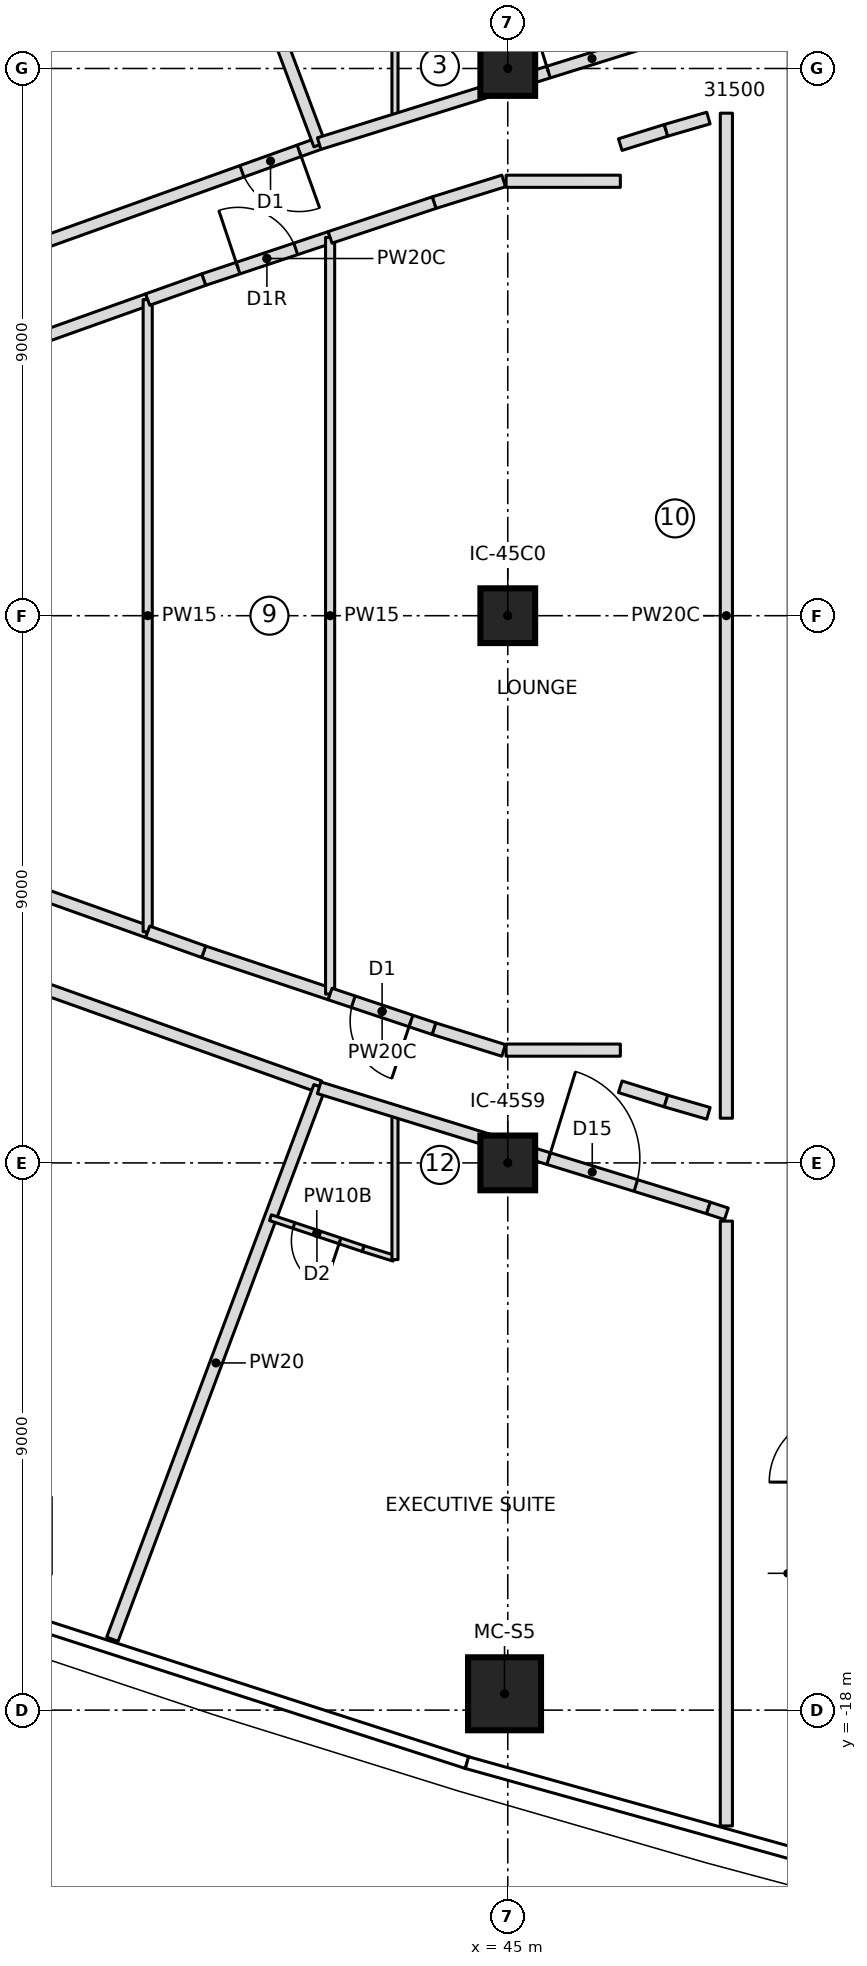
"""IFC4 building model, lengths in metres.
Left out: names, types, materials, properties, quantities, classifications, styles, units other than length and angle.
Written with IfcOpenShell. Run it as: python <this file> out.ifc"""

import sys

from ifc_helpers import new_model, si_unit, direction, frame, frame_2d, origin, origin_2d, place, context, subcontext, project, spatial, rectangle, extrude, element, fill, save


model = new_model("IFC4")
c1 = context("Model", 3, precision=1e-05, world=origin(), true_north=direction((0.0, 1.0)))
c2 = subcontext(c1, "Body", "Model", "MODEL_VIEW")
j1 = project(units=[si_unit("LENGTHUNIT", "METRE"), si_unit("PLANEANGLEUNIT", "RADIAN")], contexts=[c1])
p1 = place(None, origin())
s1 = spatial("IfcSite", under=j1, at=p1, CompositionType="ELEMENT")
p2 = place(p1, origin())
s2 = spatial("IfcBuilding", under=s1, at=p2, CompositionType="ELEMENT")
p3 = place(p2, frame((0.0, 0.0, 227.9)))
s3 = spatial("IfcBuildingStorey", under=s2, at=p3, CompositionType="ELEMENT", Elevation=227.9)
p4 = place(p3, frame((44.947, -17.731, 0.0), z_axis=(0.0, 0.0, 1.0), x_axis=(1.0, 0.0, 0.0)))
e1 = element("IfcColumn", 1, at=p4, inside=s3, PredefinedType="COLUMN", context=c2, shape_type="SweptSolid", body=[
    extrude(rectangle(XDim=1.2, YDim=1.2, at=origin_2d()), origin(), (0.0, 0.0, 1.0), 3.55),
])
for number, where, z_axis, x_axis in (
    (2, (45.0, -9.0, 0.0), (0.0, 0.0, 1.0), (1.0, 0.0, 0.0)),
    (3, (45.0, 0.0, 0.0), (0.0, 0.0, 1.0), (1.0, 0.0, 0.0)),
    (4, (45.0, 9.0, 0.0), (0.0, 0.0, 1.0), (1.0, 0.0, 0.0)),
):
    element("IfcColumn", number, at=place(p3, frame(where, z_axis=z_axis, x_axis=x_axis)), inside=s3, PredefinedType="COLUMN", context=c2, shape_type="SweptSolid", body=[
        extrude(rectangle(XDim=0.9, YDim=0.9, at=origin_2d()), origin(), (0.0, 0.0, 1.0), 3.55),
    ])
p5 = place(p3, frame((41.898, 7.764, 0.0), z_axis=(0.0, 0.0, 1.0), x_axis=(-0.941277643829, -0.337633525034, 0.0)))
e5 = element("IfcWall", 5, at=p5, inside=s3, PredefinedType="PARTITIONING", context=c2, shape_type="SweptSolid", body=[
    extrude(rectangle(XDim=10.001, YDim=0.2, at=frame_2d((5.0, 0.0))), origin(), (0.0, 0.0, 1.0), 3.25),
])
p6 = place(p5, frame((0.35, 0.0, 0.0)))
e6 = element("IfcOpeningElement", 6, at=p6, cuts=e5, PredefinedType="OPENING", context=c2, shape_type="SweptSolid", body=[
    extrude(rectangle(XDim=1.0, YDim=2.1, at=frame_2d((0.5, 1.05))), frame((0.0, 0.11, 0.0), z_axis=(0.0, -1.0, 0.0), x_axis=(1.0, 0.0, 0.0)), (0.0, 0.0, 1.0), 0.22),
])
p7 = place(p3, frame((41.906, 7.746, 0.0), z_axis=(0.0, 0.0, 1.0), x_axis=(-0.35112895446, 0.936327110224, 0.0)))
e7 = element("IfcWall", 7, at=p7, inside=s3, PredefinedType="PARTITIONING", context=c2, shape_type="SweptSolid", body=[
    extrude(rectangle(XDim=9.706, YDim=0.2, at=frame_2d((4.853, 0.0))), origin(), (0.0, 0.0, 1.0), 3.25),
])
p8 = place(p3, frame((32.485, -4.388, 0.0), z_axis=(0.0, 0.0, 1.0), x_axis=(0.941953797829, -0.335742524498, 0.0)))
e8 = element("IfcWall", 8, at=p8, inside=s3, PredefinedType="PARTITIONING", context=c2, shape_type="SweptSolid", body=[
    extrude(rectangle(XDim=10.001, YDim=0.2, at=frame_2d((5.001, 0.0))), origin(), (0.0, 0.0, 1.0), 3.25),
])
p9 = place(p8, frame((3.7, 0.0, 0.0)))
e9 = element("IfcOpeningElement", 9, at=p9, cuts=e8, PredefinedType="OPENING", context=c2, shape_type="SweptSolid", body=[
    extrude(rectangle(XDim=1.0, YDim=2.1, at=frame_2d((0.5, 1.05))), frame((0.0, 0.11, 0.0), z_axis=(0.0, -1.0, 0.0), x_axis=(1.0, 0.0, 0.0)), (0.0, 0.0, 1.0), 0.22),
])
p10 = place(p3, frame((38.497, -16.834, 0.0), z_axis=(0.0, 0.0, 1.0), x_axis=(0.35112895446, 0.936327110224, 0.0)))
e10 = element("IfcWall", 10, at=p10, inside=s3, PredefinedType="PARTITIONING", context=c2, shape_type="SweptSolid", body=[
    extrude(rectangle(XDim=9.706, YDim=0.2, at=frame_2d((4.853, 0.0))), origin(), (0.0, 0.0, 1.0), 3.25),
])
p11 = place(p3, frame((43.128, -10.568, 0.0), z_axis=(0.0, 0.0, 1.0), x_axis=(-0.954618903587, 0.297830067176, 0.0)))
e11 = element("IfcWall", 11, at=p11, inside=s3, PredefinedType="PARTITIONING", context=c2, shape_type="SweptSolid", body=[
    extrude(rectangle(XDim=0.531, YDim=0.1, at=frame_2d((0.266, 0.0))), origin(), (0.0, 0.0, 1.0), 3.25),
])
p12 = place(p3, frame((42.621, -10.409, 0.0), z_axis=(0.0, 0.0, 1.0), x_axis=(-0.948485479965, 0.3168206027, 0.0)))
e12 = element("IfcWall", 12, at=p12, inside=s3, PredefinedType="PARTITIONING", context=c2, shape_type="SweptSolid", body=[
    extrude(rectangle(XDim=1.606, YDim=0.1, at=frame_2d((0.803, 0.0))), origin(), (0.0, 0.0, 1.0), 3.25),
])
p13 = place(p12, frame((0.4, 0.0, 0.0)))
e13 = element("IfcOpeningElement", 13, at=p13, cuts=e12, PredefinedType="OPENING", context=c2, shape_type="SweptSolid", body=[
    extrude(rectangle(XDim=0.8, YDim=2.1, at=frame_2d((0.4, 1.05))), frame((0.0, 0.06, 0.0), z_axis=(0.0, -1.0, 0.0), x_axis=(1.0, 0.0, 0.0)), (0.0, 0.0, 1.0), 0.12),
])
for number, where, z_axis, x_axis in (
    (14, (39.078, -5.199, 0.0), (0.0, 0.0, 1.0), (-0.942, 0.336, 0.0)),
    (15, (36.236, 4.186, 0.0), (0.0, 0.0, 1.0), (0.942, 0.336, 0.0)),
):
    element("IfcWall", number, at=place(p3, frame(where, z_axis=z_axis, x_axis=x_axis)), inside=s3, PredefinedType="PARTITIONING", context=c2, shape_type="SweptSolid", body=[
        extrude(rectangle(XDim=3.017, YDim=0.2, at=frame_2d((1.509, 0.0))), origin(), (0.0, 0.0, 1.0), 3.25),
    ])
p14 = place(p3, frame((39.078, -5.199, 0.0), z_axis=(0.0, 0.0, 1.0), x_axis=(0.0, 1.0, 0.0)))
e16 = element("IfcWall", 16, at=p14, inside=s3, PredefinedType="PARTITIONING", context=c2, shape_type="SweptSolid", body=[
    extrude(rectangle(XDim=10.398, YDim=0.15, at=frame_2d((5.199, 0.0))), origin(), (0.0, 0.0, 1.0), 3.25),
])
p15 = place(p3, frame((39.999, 5.527, 0.0), z_axis=(0.0, 0.0, 1.0), x_axis=(0.9484714727, 0.316862534034, 0.0)))
e17 = element("IfcWall", 17, at=p15, inside=s3, PredefinedType="PARTITIONING", context=c2, shape_type="SweptSolid", body=[
    extrude(rectangle(XDim=2.192, YDim=0.2, at=frame_2d((1.096, 0.0))), origin(), (0.0, 0.0, 1.0), 3.25),
])
p16 = place(p15, frame((0.596, 0.0, 0.0)))
e18 = element("IfcOpeningElement", 18, at=p16, cuts=e17, PredefinedType="OPENING", context=c2, shape_type="SweptSolid", body=[
    extrude(rectangle(XDim=1.0, YDim=2.1, at=frame_2d((0.5, 1.05))), frame((0.0, 0.11, 0.0), z_axis=(0.0, -1.0, 0.0), x_axis=(1.0, 0.0, 0.0)), (0.0, 0.0, 1.0), 0.22),
])
p17 = place(p3, frame((42.078, -6.222, 0.0), z_axis=(0.0, 0.0, 1.0), x_axis=(-0.9484714727, 0.316862534034, 0.0)))
e19 = element("IfcWall", 19, at=p17, inside=s3, PredefinedType="PARTITIONING", context=c2, shape_type="SweptSolid", body=[
    extrude(rectangle(XDim=2.192, YDim=0.2, at=frame_2d((1.096, 0.0))), origin(), (0.0, 0.0, 1.0), 3.25),
])
for number, where, z_axis, x_axis in (
    (20, (39.999, -5.527, 0.0), (0.0, 0.0, 1.0), (-0.942, 0.336, 0.0)),
    (21, (39.078, 5.199, 0.0), (0.0, 0.0, 1.0), (0.942, 0.336, 0.0)),
):
    element("IfcWall", number, at=place(p3, frame(where, z_axis=z_axis, x_axis=x_axis)), inside=s3, PredefinedType="PARTITIONING", context=c2, shape_type="SweptSolid", body=[
        extrude(rectangle(XDim=0.978, YDim=0.2, at=frame_2d((0.489, 0.0))), origin(), (0.0, 0.0, 1.0), 3.25),
    ])
p18 = place(p3, frame((42.078, -6.222, 0.0), z_axis=(0.0, 0.0, 1.0), x_axis=(0.0, 1.0, 0.0)))
e22 = element("IfcWall", 22, at=p18, inside=s3, PredefinedType="PARTITIONING", context=c2, shape_type="SweptSolid", body=[
    extrude(rectangle(XDim=12.444, YDim=0.15, at=frame_2d((6.222, 0.0))), origin(), (0.0, 0.0, 1.0), 3.25),
])
p19 = place(p3, frame((43.788, -6.793, 0.0), z_axis=(0.0, 0.0, 1.0), x_axis=(-0.948466406859, 0.316877697323, 0.0)))
e23 = element("IfcWall", 23, at=p19, inside=s3, PredefinedType="PARTITIONING", context=c2, shape_type="SweptSolid", body=[
    extrude(rectangle(XDim=1.803, YDim=0.2, at=frame_2d((0.901, 0.0))), origin(), (0.0, 0.0, 1.0), 3.25),
])
p20 = place(p19, frame((0.402, 0.0, 0.0)))
e24 = element("IfcOpeningElement", 24, at=p20, cuts=e23, PredefinedType="OPENING", context=c2, shape_type="SweptSolid", body=[
    extrude(rectangle(XDim=1.0, YDim=2.1, at=frame_2d((0.5, 1.05))), frame((0.0, 0.11, 0.0), z_axis=(0.0, -1.0, 0.0), x_axis=(1.0, 0.0, 0.0)), (0.0, 0.0, 1.0), 0.22),
])
p21 = place(p3, frame((43.788, 6.793, 0.0), z_axis=(0.0, 0.0, 1.0), x_axis=(0.954693570678, 0.29759063511, 0.0)))
e25 = element("IfcWall", 25, at=p21, inside=s3, PredefinedType="PARTITIONING", context=c2, shape_type="SweptSolid", body=[
    extrude(rectangle(XDim=1.198, YDim=0.2, at=frame_2d((0.599, 0.0))), origin(), (0.0, 0.0, 1.0), 3.25),
])
for number, where, z_axis, x_axis in (
    (26, (46.85, 7.748, 0.0), (0.0, 0.0, 1.0), (0.955, 0.298, 0.0)),
    (27, (47.602, -7.982, 0.0), (0.0, 0.0, 1.0), (-0.955, 0.298, 0.0)),
):
    element("IfcWall", number, at=place(p3, frame(where, z_axis=z_axis, x_axis=x_axis)), inside=s3, PredefinedType="PARTITIONING", context=c2, shape_type="SweptSolid", body=[
        extrude(rectangle(XDim=0.788, YDim=0.2, at=frame_2d((0.394, 0.0))), origin(), (0.0, 0.0, 1.0), 3.25),
    ])
p22 = place(p3, frame((44.933, -7.15, 0.0), z_axis=(0.0, 0.0, 1.0), x_axis=(-0.954693570678, 0.29759063511, 0.0)))
e28 = element("IfcWall", 28, at=p22, inside=s3, PredefinedType="PARTITIONING", context=c2, shape_type="SweptSolid", body=[
    extrude(rectangle(XDim=1.198, YDim=0.2, at=frame_2d((0.599, 0.0))), origin(), (0.0, 0.0, 1.0), 3.25),
])
p23 = place(p3, frame((42.078, 6.222, 0.0), z_axis=(0.0, 0.0, 1.0), x_axis=(0.948466406859, 0.316877697323, 0.0)))
e29 = element("IfcWall", 29, at=p23, inside=s3, PredefinedType="PARTITIONING", context=c2, shape_type="SweptSolid", body=[
    extrude(rectangle(XDim=1.803, YDim=0.2, at=frame_2d((0.901, 0.0))), origin(), (0.0, 0.0, 1.0), 3.25),
])
for number, where, z_axis, x_axis in (
    (30, (43.145, 10.59, 0.0), (0.0, 0.0, 1.0), (0.0, -1.0, 0.0)),
    (31, (43.145, -8.165, 0.0), (0.0, 0.0, 1.0), (0.0, -1.0, 0.0)),
):
    element("IfcWall", number, at=place(p3, frame(where, z_axis=z_axis, x_axis=x_axis)), inside=s3, PredefinedType="PARTITIONING", context=c2, shape_type="SweptSolid", body=[
        extrude(rectangle(XDim=2.425, YDim=0.1, at=frame_2d((1.213, 0.0))), origin(), (0.0, 0.0, 1.0), 3.25),
    ])
p24 = place(p3, frame((41.898, 7.764, 0.0), z_axis=(0.0, 0.0, 1.0), x_axis=(0.954667015156, 0.297675813886, 0.0)))
e32 = element("IfcWall", 32, at=p24, inside=s3, PredefinedType="PARTITIONING", context=c2, shape_type="SweptSolid", body=[
    extrude(rectangle(XDim=6.706, YDim=0.2, at=frame_2d((3.353, 0.0))), origin(), (0.0, 0.0, 1.0), 3.25),
])
p25 = place(p24, frame((3.95, 0.0, 0.0)))
e33 = element("IfcOpeningElement", 33, at=p25, cuts=e32, PredefinedType="OPENING", context=c2, shape_type="SweptSolid", body=[
    extrude(rectangle(XDim=1.5, YDim=2.1, at=frame_2d((0.75, 1.05))), frame((0.0, 0.11, 0.0), z_axis=(0.0, -1.0, 0.0), x_axis=(1.0, 0.0, 0.0)), (0.0, 0.0, 1.0), 0.22),
])
p26 = place(p3, frame((41.898, -7.764, 0.0), z_axis=(0.0, 0.0, 1.0), x_axis=(0.955502033518, -0.294984514752, 0.0)))
e34 = element("IfcWall", 34, at=p26, inside=s3, PredefinedType="PARTITIONING", context=c2, shape_type="SweptSolid", body=[
    extrude(rectangle(XDim=6.7, YDim=0.2, at=frame_2d((3.35, 0.0))), origin(), (0.0, 0.0, 1.0), 3.25),
])
p27 = place(p26, frame((3.95, 0.0, 0.0)))
e35 = element("IfcOpeningElement", 35, at=p27, cuts=e34, PredefinedType="OPENING", context=c2, shape_type="SweptSolid", body=[
    extrude(rectangle(XDim=1.5, YDim=2.1, at=frame_2d((0.75, 1.05))), frame((0.0, 0.11, 0.0), z_axis=(0.0, -1.0, 0.0), x_axis=(1.0, 0.0, 0.0)), (0.0, 0.0, 1.0), 0.22),
])
for number, where, z_axis, x_axis in (
    (36, (47.602, 7.982, 0.0), (0.0, 0.0, 1.0), (0.96, 0.278, 0.0)),
    (37, (48.3, -8.185, 0.0), (0.0, 0.0, 1.0), (-0.96, 0.278, 0.0)),
):
    element("IfcWall", number, at=place(p3, frame(where, z_axis=z_axis, x_axis=x_axis)), inside=s3, PredefinedType="PARTITIONING", context=c2, shape_type="SweptSolid", body=[
        extrude(rectangle(XDim=0.727, YDim=0.2, at=frame_2d((0.363, 0.0))), origin(), (0.0, 0.0, 1.0), 3.25),
    ])
p28 = place(p3, frame((44.972, 7.145, 0.0), z_axis=(0.0, 0.0, 1.0), x_axis=(0.99999999156, 0.000129920747, 0.0)))
e38 = element("IfcWall", 38, at=p28, inside=s3, PredefinedType="PARTITIONING", context=c2, shape_type="SweptSolid", body=[
    extrude(rectangle(XDim=1.879, YDim=0.2, at=frame_2d((0.939, 0.0))), origin(), (0.0, 0.0, 1.0), 3.25),
])
p29 = place(p3, frame((48.595, 8.265, 0.0), z_axis=(0.0, 0.0, 1.0), x_axis=(0.0, -1.0, 0.0)))
e39 = element("IfcWall", 39, at=p29, inside=s3, PredefinedType="PARTITIONING", context=c2, shape_type="SweptSolid", body=[
    extrude(rectangle(XDim=16.53, YDim=0.2, at=frame_2d((8.265, 0.0))), origin(), (0.0, 0.0, 1.0), 3.25),
])
p30 = place(p3, frame((46.852, -7.145, 0.0), z_axis=(0.0, 0.0, 1.0), x_axis=(-0.99999999156, 0.000129920747, 0.0)))
e40 = element("IfcWall", 40, at=p30, inside=s3, PredefinedType="PARTITIONING", context=c2, shape_type="SweptSolid", body=[
    extrude(rectangle(XDim=1.879, YDim=0.2, at=frame_2d((0.939, 0.0))), origin(), (0.0, 0.0, 1.0), 3.25),
])
p31 = place(p3, frame((48.3, -9.741, 0.0), z_axis=(0.0, 0.0, 1.0), x_axis=(0.950709666312, -0.31008245739, 0.0)))
e41 = element("IfcWall", 41, at=p31, inside=s3, PredefinedType="PARTITIONING", context=c2, shape_type="SweptSolid", body=[
    extrude(rectangle(XDim=0.31, YDim=0.2, at=frame_2d((0.155, 0.0))), origin(), (0.0, 0.0, 1.0), 3.25),
])
p32 = place(p3, frame((48.595, -9.957, 0.0), z_axis=(0.0, 0.0, 1.0), x_axis=(0.0, -1.0, 0.0)))
e42 = element("IfcWall", 42, at=p32, inside=s3, PredefinedType="PARTITIONING", context=c2, shape_type="SweptSolid", body=[
    extrude(rectangle(XDim=9.947, YDim=0.2, at=frame_2d((4.974, 0.0))), origin(), (0.0, 0.0, 1.0), 3.25),
])
p33 = place(p6, origin())
e43 = element("IfcDoor", 43, at=p33, inside=s3, OperationType="SINGLE_SWING_LEFT", PredefinedType="DOOR", context=c2, shape_type="SweptSolid", body=[
    extrude(rectangle(XDim=1.0, YDim=2.1, at=frame_2d((0.5, 1.05))), frame((0.0, 0.025, 0.0), z_axis=(0.0, -1.0, 0.0), x_axis=(1.0, 0.0, 0.0)), (0.0, 0.0, 1.0), 0.05),
])
fill(e6, e43)
p34 = place(p25, origin())
e44 = element("IfcDoor", 44, at=p34, inside=s3, OperationType="DOUBLE_DOOR_SINGLE_SWING", PredefinedType="DOOR", context=c2, shape_type="SweptSolid", body=[
    extrude(rectangle(XDim=1.5, YDim=2.1, at=frame_2d((0.75, 1.05))), frame((0.0, 0.025, 0.0), z_axis=(0.0, -1.0, 0.0), x_axis=(1.0, 0.0, 0.0)), (0.0, 0.0, 1.0), 0.05),
])
fill(e33, e44)
p35 = place(p13, origin())
e45 = element("IfcDoor", 45, at=p35, inside=s3, OperationType="SINGLE_SWING_LEFT", PredefinedType="DOOR", context=c2, shape_type="SweptSolid", body=[
    extrude(rectangle(XDim=0.8, YDim=2.1, at=frame_2d((0.4, 1.05))), frame((0.0, 0.025, 0.0), z_axis=(0.0, -1.0, 0.0), x_axis=(1.0, 0.0, 0.0)), (0.0, 0.0, 1.0), 0.05),
])
fill(e13, e45)
p36 = place(p27, origin())
e46 = element("IfcDoor", 46, at=p36, inside=s3, OperationType="DOUBLE_DOOR_SINGLE_SWING", PredefinedType="DOOR", context=c2, shape_type="SweptSolid", body=[
    extrude(rectangle(XDim=1.5, YDim=2.1, at=frame_2d((0.75, 1.05))), frame((0.0, 0.025, 0.0), z_axis=(0.0, -1.0, 0.0), x_axis=(1.0, 0.0, 0.0)), (0.0, 0.0, 1.0), 0.05),
])
fill(e35, e46)
p37 = place(p16, origin())
e47 = element("IfcDoor", 47, at=p37, inside=s3, OperationType="SINGLE_SWING_RIGHT", PredefinedType="DOOR", context=c2, shape_type="SweptSolid", body=[
    extrude(rectangle(XDim=1.0, YDim=2.1, at=frame_2d((0.5, 1.05))), frame((0.0, 0.025, 0.0), z_axis=(0.0, -1.0, 0.0), x_axis=(1.0, 0.0, 0.0)), (0.0, 0.0, 1.0), 0.05),
])
fill(e18, e47)
p38 = place(p20, origin())
e48 = element("IfcDoor", 48, at=p38, inside=s3, OperationType="SINGLE_SWING_LEFT", PredefinedType="DOOR", context=c2, shape_type="SweptSolid", body=[
    extrude(rectangle(XDim=1.0, YDim=2.1, at=frame_2d((0.5, 1.05))), frame((0.0, 0.025, 0.0), z_axis=(0.0, -1.0, 0.0), x_axis=(1.0, 0.0, 0.0)), (0.0, 0.0, 1.0), 0.05),
])
fill(e24, e48)
save(model, sys.argv[1])
